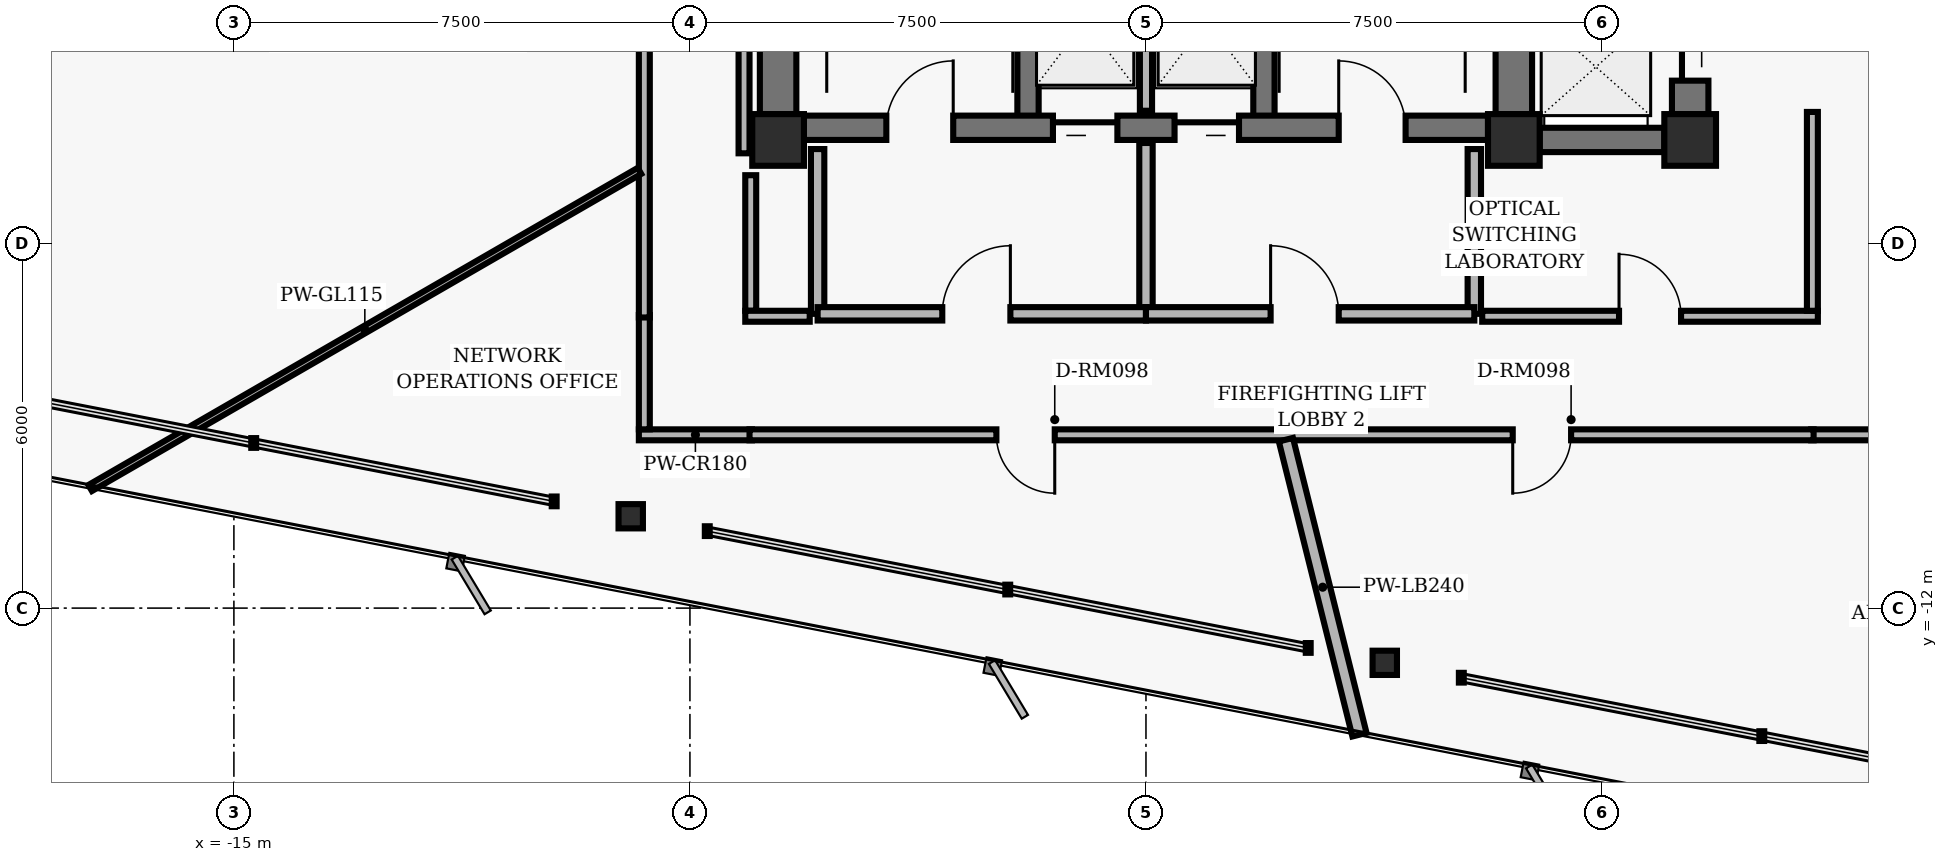
"""IFC4 building model, lengths in metres.
Left out: names, types, materials, properties, quantities, classifications, styles, units other than length and angle.
Written with IfcOpenShell. Run it as: python <this file> out.ifc"""

import sys

from ifc_helpers import new_model, si_unit, direction, frame, frame_2d, origin, origin_2d, place, context, subcontext, project, spatial, rectangle, hollow_rectangle, i_section, extrude, element, fill, save


model = new_model("IFC4")
c1 = context("Model", 3, precision=1e-05, world=origin(), true_north=direction((0.0, 1.0)))
c2 = subcontext(c1, "Body", "Model", "MODEL_VIEW")
j1 = project(units=[si_unit("LENGTHUNIT", "METRE"), si_unit("PLANEANGLEUNIT", "RADIAN")], contexts=[c1])
p1 = place(None, origin())
s1 = spatial("IfcSite", under=j1, at=p1, CompositionType="ELEMENT")
p2 = place(p1, origin())
s2 = spatial("IfcBuilding", under=s1, at=p2, CompositionType="ELEMENT")
p3 = place(p2, frame((0.0, 0.0, 147.2)))
s3 = spatial("IfcBuildingStorey", under=s2, at=p3, CompositionType="ELEMENT", Elevation=147.2)
for number, where, z_axis, x_axis in (
    (1, (-6.05, -4.3, 0.0), (0.0, 0.0, 1.0), (1.0, 0.0, 0.0)),
    (2, (6.05, -4.3, 0.0), (0.0, 0.0, 1.0), (1.0, 0.0, 0.0)),
    (3, (8.95, -4.3, 0.0), (0.0, 0.0, 1.0), (1.0, 0.0, 0.0)),
):
    element("IfcColumn", number, at=place(p3, frame(where, z_axis=z_axis, x_axis=x_axis)), inside=s3, PredefinedType="COLUMN", context=c2, shape_type="SweptSolid", body=[
        extrude(hollow_rectangle(XDim=0.85, YDim=0.85, WallThickness=0.055, InnerFilletRadius=0.02, OuterFilletRadius=0.04, at=origin_2d()), origin(), (0.0, 0.0, 1.0), 3.04),
    ])
for number, where, z_axis, x_axis in (
    (4, (-6.05, -3.875, 0.0), (0.0, 0.0, 1.0), (0.0, 1.0, 0.0)),
    (5, (6.05, -3.875, 0.0), (0.0, 0.0, 1.0), (0.0, 1.0, 0.0)),
):
    element("IfcWall", number, at=place(p3, frame(where, z_axis=z_axis, x_axis=x_axis)), inside=s3, PredefinedType="SHEAR", context=c2, shape_type="SweptSolid", body=[
        extrude(rectangle(XDim=3.45, YDim=0.6, at=frame_2d((1.725, 0.0))), origin(), (0.0, 0.0, 1.0), 2.788),
    ])
for number, where, z_axis, x_axis in (
    (6, (-1.94, -4.1, 0.0), (0.0, 0.0, 1.0), (0.0, 1.0, 0.0)),
    (7, (1.94, -4.1, 0.0), (0.0, 0.0, 1.0), (0.0, 1.0, 0.0)),
):
    element("IfcWall", number, at=place(p3, frame(where, z_axis=z_axis, x_axis=x_axis)), inside=s3, PredefinedType="SHEAR", context=c2, shape_type="SweptSolid", body=[
        extrude(rectangle(XDim=8.2, YDim=0.35, at=frame_2d((4.1, 0.0))), origin(), (0.0, 0.0, 1.0), 2.788),
    ])
p4 = place(p3, frame((-5.625, -4.1, 0.0), z_axis=(0.0, 0.0, 1.0), x_axis=(1.0, 0.0, 0.0)))
e8 = element("IfcWall", 8, at=p4, inside=s3, PredefinedType="SHEAR", context=c2, shape_type="SweptSolid", body=[
    extrude(rectangle(XDim=11.25, YDim=0.4, at=frame_2d((5.625, 0.0))), origin(), (0.0, 0.0, 1.0), 2.788),
])
p5 = place(p4, frame((1.355, 0.0, 0.0)))
e9 = element("IfcOpeningElement", 9, at=p5, cuts=e8, PredefinedType="OPENING", context=c2, shape_type="SweptSolid", body=[
    extrude(rectangle(XDim=1.1, YDim=2.04, at=frame_2d((0.55, 1.02))), frame((0.0, 0.21, 0.0), z_axis=(0.0, -1.0, 0.0), x_axis=(1.0, 0.0, 0.0)), (0.0, 0.0, 1.0), 0.42),
])
p6 = place(p4, frame((8.795, 0.0, 0.0)))
e10 = element("IfcOpeningElement", 10, at=p6, cuts=e8, PredefinedType="OPENING", context=c2, shape_type="SweptSolid", body=[
    extrude(rectangle(XDim=1.1, YDim=2.04, at=frame_2d((0.55, 1.02))), frame((0.0, 0.21, 0.0), z_axis=(0.0, -1.0, 0.0), x_axis=(1.0, 0.0, 0.0)), (0.0, 0.0, 1.0), 0.42),
])
p7 = place(p4, frame((4.095, 0.0, 0.0)))
e11 = element("IfcOpeningElement", 11, at=p7, cuts=e8, PredefinedType="OPENING", context=c2, shape_type="SweptSolid", body=[
    extrude(rectangle(XDim=1.06, YDim=2.04, at=frame_2d((0.53, 1.02))), frame((0.0, 0.21, 0.0), z_axis=(0.0, -1.0, 0.0), x_axis=(1.0, 0.0, 0.0)), (0.0, 0.0, 1.0), 0.42),
])
p8 = place(p4, frame((6.095, 0.0, 0.0)))
e12 = element("IfcOpeningElement", 12, at=p8, cuts=e8, PredefinedType="OPENING", context=c2, shape_type="SweptSolid", body=[
    extrude(rectangle(XDim=1.06, YDim=2.04, at=frame_2d((0.53, 1.02))), frame((0.0, 0.21, 0.0), z_axis=(0.0, -1.0, 0.0), x_axis=(1.0, 0.0, 0.0)), (0.0, 0.0, 1.0), 0.42),
])
p9 = place(p3, frame((8.95, -3.875, 0.0), z_axis=(0.0, 0.0, 1.0), x_axis=(0.0, 1.0, 0.0)))
e13 = element("IfcWall", 13, at=p9, inside=s3, PredefinedType="SHEAR", context=c2, shape_type="SweptSolid", body=[
    extrude(rectangle(XDim=7.95, YDim=0.6, at=frame_2d((3.975, 0.0))), origin(), (0.0, 0.0, 1.0), 2.788),
])
p10 = place(p9, frame((0.55, 0.0, 0.0)))
e14 = element("IfcOpeningElement", 14, at=p10, cuts=e13, PredefinedType="OPENING", context=c2, shape_type="SweptSolid", body=[
    extrude(rectangle(XDim=1.06, YDim=2.04, at=frame_2d((0.53, 1.02))), frame((0.0, 0.31, 0.0), z_axis=(0.0, -1.0, 0.0), x_axis=(1.0, 0.0, 0.0)), (0.0, 0.0, 1.0), 0.62),
])
p11 = place(p9, frame((3.445, 0.0, 0.0)))
e15 = element("IfcOpeningElement", 15, at=p11, cuts=e13, PredefinedType="OPENING", context=c2, shape_type="SweptSolid", body=[
    extrude(rectangle(XDim=1.06, YDim=2.04, at=frame_2d((0.53, 1.02))), frame((0.0, 0.31, 0.0), z_axis=(0.0, -1.0, 0.0), x_axis=(1.0, 0.0, 0.0)), (0.0, 0.0, 1.0), 0.62),
])
p12 = place(p9, frame((6.33, 0.0, 0.0)))
e16 = element("IfcOpeningElement", 16, at=p12, cuts=e13, PredefinedType="OPENING", context=c2, shape_type="SweptSolid", body=[
    extrude(rectangle(XDim=1.06, YDim=2.04, at=frame_2d((0.53, 1.02))), frame((0.0, 0.31, 0.0), z_axis=(0.0, -1.0, 0.0), x_axis=(1.0, 0.0, 0.0)), (0.0, 0.0, 1.0), 0.62),
])
p13 = place(p3, frame((6.475, -4.3, 0.0), z_axis=(0.0, 0.0, 1.0), x_axis=(1.0, 0.0, 0.0)))
e17 = element("IfcWall", 17, at=p13, inside=s3, PredefinedType="SHEAR", context=c2, shape_type="SweptSolid", body=[
    extrude(rectangle(XDim=2.05, YDim=0.4, at=frame_2d((1.025, 0.0))), origin(), (0.0, 0.0, 1.0), 2.788),
])
for number, where, z_axis, x_axis in (
    (18, (-8.474, -10.49, 0.0), (0.0, 0.0, 1.0), (1.0, 0.0, 0.0)),
    (19, (3.927, -12.9, 0.0), (0.0, 0.0, 1.0), (1.0, 0.0, 0.0)),
):
    element("IfcColumn", number, at=place(p3, frame(where, z_axis=z_axis, x_axis=x_axis)), inside=s3, PredefinedType="COLUMN", context=c2, shape_type="SweptSolid", body=[
        extrude(i_section(OverallWidth=0.401, OverallDepth=0.399, WebThickness=0.025, FlangeThickness=0.04, FilletRadius=0.018, at=origin_2d()), origin(), (0.0, 0.0, 1.0), 3.04),
    ])
p14 = place(p3, frame((0.0, -3.82, 0.0), z_axis=(0.0, 0.0, 1.0), x_axis=(0.0, 1.0, 0.0)))
e20 = element("IfcWall", 20, at=p14, inside=s3, PredefinedType="PARTITIONING", context=c2, shape_type="SweptSolid", body=[
    extrude(rectangle(XDim=2.67, YDim=0.2, at=frame_2d((1.335, 0.0))), origin(), (0.0, 0.0, 1.0), 2.763),
])
for number, where, z_axis, x_axis in (
    (21, (-5.4, -7.16, 0.0), (0.0, 0.0, 1.0), (0.0, 1.0, 0.0)),
    (22, (5.4, -7.16, 0.0), (0.0, 0.0, 1.0), (0.0, 1.0, 0.0)),
):
    element("IfcWall", number, at=place(p3, frame(where, z_axis=z_axis, x_axis=x_axis)), inside=s3, PredefinedType="PARTITIONING", context=c2, shape_type="SweptSolid", body=[
        extrude(rectangle(XDim=2.71, YDim=0.22, at=frame_2d((1.355, 0.0))), origin(), (0.0, 0.0, 1.0), 2.763),
    ])
p15 = place(p3, frame((0.0, -7.16, 0.0), z_axis=(0.0, 0.0, 1.0), x_axis=(0.0, 1.0, 0.0)))
e23 = element("IfcWall", 23, at=p15, inside=s3, PredefinedType="PARTITIONING", context=c2, shape_type="SweptSolid", body=[
    extrude(rectangle(XDim=2.81, YDim=0.22, at=frame_2d((1.405, 0.0))), origin(), (0.0, 0.0, 1.0), 2.763),
])
p16 = place(p3, frame((-5.4, -7.16, 0.0), z_axis=(0.0, 0.0, 1.0), x_axis=(1.0, 0.0, 0.0)))
e24 = element("IfcWall", 24, at=p16, inside=s3, PredefinedType="PARTITIONING", context=c2, shape_type="SweptSolid", body=[
    extrude(rectangle(XDim=5.4, YDim=0.22, at=frame_2d((2.7, 0.0))), origin(), (0.0, 0.0, 1.0), 2.33),
])
p17 = place(p16, frame((2.05, 0.0, 0.0)))
e25 = element("IfcOpeningElement", 25, at=p17, cuts=e24, PredefinedType="OPENING", context=c2, shape_type="SweptSolid", body=[
    extrude(rectangle(XDim=1.12, YDim=2.02, at=frame_2d((0.56, 1.01))), frame((0.0, 0.12, 0.0), z_axis=(0.0, -1.0, 0.0), x_axis=(1.0, 0.0, 0.0)), (0.0, 0.0, 1.0), 0.24),
])
p18 = place(p3, frame((0.0, -7.16, 0.0), z_axis=(0.0, 0.0, 1.0), x_axis=(1.0, 0.0, 0.0)))
e26 = element("IfcWall", 26, at=p18, inside=s3, PredefinedType="PARTITIONING", context=c2, shape_type="SweptSolid", body=[
    extrude(rectangle(XDim=5.4, YDim=0.22, at=frame_2d((2.7, 0.0))), origin(), (0.0, 0.0, 1.0), 2.33),
])
p19 = place(p18, frame((2.05, 0.0, 0.0)))
e27 = element("IfcOpeningElement", 27, at=p19, cuts=e26, PredefinedType="OPENING", context=c2, shape_type="SweptSolid", body=[
    extrude(rectangle(XDim=1.12, YDim=2.02, at=frame_2d((0.56, 1.01))), frame((0.0, 0.12, 0.0), z_axis=(0.0, -1.0, 0.0), x_axis=(1.0, 0.0, 0.0)), (0.0, 0.0, 1.0), 0.24),
])
p20 = place(p3, frame((-6.48, -9.15, 0.0), z_axis=(0.0, 0.0, 1.0), x_axis=(-1.0, 0.0, 0.0)))
e28 = element("IfcWall", 28, at=p20, inside=s3, PredefinedType="PARTITIONING", context=c2, shape_type="SweptSolid", body=[
    extrude(rectangle(XDim=1.86, YDim=0.18, at=frame_2d((0.93, 0.0))), origin(), (0.0, 0.0, 1.0), 2.33),
])
p21 = place(p3, frame((-8.25, -9.06, 0.0), z_axis=(0.0, 0.0, 1.0), x_axis=(0.0, 1.0, 0.0)))
e29 = element("IfcWall", 29, at=p21, inside=s3, PredefinedType="PARTITIONING", context=c2, shape_type="SweptSolid", body=[
    extrude(rectangle(XDim=1.88, YDim=0.18, at=frame_2d((0.94, 0.0))), origin(), (0.0, 0.0, 1.0), 2.763),
])
p22 = place(p3, frame((-8.25, -7.22, 0.0), z_axis=(0.0, 0.0, 1.0), x_axis=(0.0, 1.0, 0.0)))
e30 = element("IfcWall", 30, at=p22, inside=s3, PredefinedType="PARTITIONING", context=c2, shape_type="SweptSolid", body=[
    extrude(rectangle(XDim=14.44, YDim=0.18, at=frame_2d((7.22, 0.0))), origin(), (0.0, 0.0, 1.0), 2.763),
])
p23 = place(p22, frame((7.366, 0.0, 0.0)))
e31 = element("IfcOpeningElement", 31, at=p23, cuts=e30, PredefinedType="OPENING", context=c2, shape_type="SweptSolid", body=[
    extrude(rectangle(XDim=0.96, YDim=2.02, at=frame_2d((0.48, 1.01))), frame((0.0, 0.1, 0.0), z_axis=(0.0, -1.0, 0.0), x_axis=(1.0, 0.0, 0.0)), (0.0, 0.0, 1.0), 0.2),
])
p24 = place(p3, frame((-6.61, 4.94, 0.0), z_axis=(0.0, 0.0, 1.0), x_axis=(0.0, -1.0, 0.0)))
e32 = element("IfcWall", 32, at=p24, inside=s3, PredefinedType="PARTITIONING", context=c2, shape_type="SweptSolid", body=[
    extrude(rectangle(XDim=9.46, YDim=0.18, at=frame_2d((4.73, 0.0))), origin(), (0.0, 0.0, 1.0), 2.763),
])
p25 = place(p3, frame((-6.5, -4.88, 0.0), z_axis=(0.0, 0.0, 1.0), x_axis=(0.0, -1.0, 0.0)))
e33 = element("IfcWall", 33, at=p25, inside=s3, PredefinedType="PARTITIONING", context=c2, shape_type="SweptSolid", body=[
    extrude(rectangle(XDim=2.23, YDim=0.18, at=frame_2d((1.115, 0.0))), origin(), (0.0, 0.0, 1.0), 2.763),
])
p26 = place(p3, frame((-6.59, -7.2, 0.0), z_axis=(0.0, 0.0, 1.0), x_axis=(1.0, 0.0, 0.0)))
e34 = element("IfcWall", 34, at=p26, inside=s3, PredefinedType="PARTITIONING", context=c2, shape_type="SweptSolid", body=[
    extrude(rectangle(XDim=1.06, YDim=0.18, at=frame_2d((0.53, 0.0))), origin(), (0.0, 0.0, 1.0), 2.763),
])
p27 = place(p3, frame((5.53, -7.2, 0.0), z_axis=(0.0, 0.0, 1.0), x_axis=(1.0, 0.0, 0.0)))
e35 = element("IfcWall", 35, at=p27, inside=s3, PredefinedType="PARTITIONING", context=c2, shape_type="SweptSolid", body=[
    extrude(rectangle(XDim=5.52, YDim=0.18, at=frame_2d((2.76, 0.0))), origin(), (0.0, 0.0, 1.0), 2.33),
])
p28 = place(p27, frame((2.25, 0.0, 0.0)))
e36 = element("IfcOpeningElement", 36, at=p28, cuts=e35, PredefinedType="OPENING", context=c2, shape_type="SweptSolid", body=[
    extrude(rectangle(XDim=1.02, YDim=2.02, at=frame_2d((0.51, 1.01))), frame((0.0, 0.1, 0.0), z_axis=(0.0, -1.0, 0.0), x_axis=(1.0, 0.0, 0.0)), (0.0, 0.0, 1.0), 0.2),
])
p29 = place(p3, frame((10.96, -7.11, 0.0), z_axis=(0.0, 0.0, 1.0), x_axis=(0.0, 1.0, 0.0)))
e37 = element("IfcWall", 37, at=p29, inside=s3, PredefinedType="PARTITIONING", context=c2, shape_type="SweptSolid", body=[
    extrude(rectangle(XDim=3.271, YDim=0.18, at=frame_2d((1.635, 0.0))), origin(), (0.0, 0.0, 1.0), 2.763),
])
p30 = place(p3, frame((10.954, 6.533, 0.0), z_axis=(0.0, 0.0, 1.0), x_axis=(0.325553439946, -0.945523642084, 0.0)))
e38 = element("IfcWall", 38, at=p30, inside=s3, PredefinedType="PARTITIONING", context=c2, shape_type="SweptSolid", body=[
    extrude(rectangle(XDim=11.22, YDim=0.18, at=frame_2d((5.61, 0.0))), origin(), (0.0, 0.0, 1.0), 2.763),
])
p31 = place(p3, frame((14.69, -9.15, 0.0), z_axis=(0.0, 0.0, 1.0), x_axis=(-1.0, 0.0, 0.0)))
e39 = element("IfcWall", 39, at=p31, inside=s3, PredefinedType="PARTITIONING", context=c2, shape_type="SweptSolid", body=[
    extrude(rectangle(XDim=3.75, YDim=0.18, at=frame_2d((1.875, 0.0))), origin(), (0.0, 0.0, 1.0), 2.763),
])
p32 = place(p3, frame((10.98, -9.15, 0.0), z_axis=(0.0, 0.0, 1.0), x_axis=(-1.0, 0.0, 0.0)))
e40 = element("IfcWall", 40, at=p32, inside=s3, PredefinedType="PARTITIONING", context=c2, shape_type="SweptSolid", body=[
    extrude(rectangle(XDim=17.5, YDim=0.18, at=frame_2d((8.75, 0.0))), origin(), (0.0, 0.0, 1.0), 2.33),
])
p33 = place(p32, frame((12.48, 0.0, 0.0)))
e41 = element("IfcOpeningElement", 41, at=p33, cuts=e40, PredefinedType="OPENING", context=c2, shape_type="SweptSolid", body=[
    extrude(rectangle(XDim=0.96, YDim=2.02, at=frame_2d((0.48, 1.01))), frame((0.0, 0.1, 0.0), z_axis=(0.0, -1.0, 0.0), x_axis=(1.0, 0.0, 0.0)), (0.0, 0.0, 1.0), 0.2),
])
p34 = place(p32, frame((3.988, 0.0, 0.0)))
e42 = element("IfcOpeningElement", 42, at=p34, cuts=e40, PredefinedType="OPENING", context=c2, shape_type="SweptSolid", body=[
    extrude(rectangle(XDim=0.96, YDim=2.02, at=frame_2d((0.48, 1.01))), frame((0.0, 0.1, 0.0), z_axis=(0.0, -1.0, 0.0), x_axis=(1.0, 0.0, 0.0)), (0.0, 0.0, 1.0), 0.2),
])
p35 = place(p3, frame((-8.33, -4.809, 0.0), z_axis=(0.0, 0.0, 1.0), x_axis=(-0.866024997974, -0.500000702884, 0.0)))
e43 = element("IfcWall", 43, at=p35, inside=s3, PredefinedType="MOVABLE", context=c2, shape_type="SweptSolid", body=[
    extrude(rectangle(XDim=10.431, YDim=0.115, at=frame_2d((5.215, 0.0))), origin(), (0.0, 0.0, 1.0), 2.132),
])
p36 = place(p3, frame((2.301, -9.23, 0.0), z_axis=(0.0, 0.0, 1.0), x_axis=(0.241903783585, -0.970300241929, 0.0)))
e44 = element("IfcWall", 44, at=p36, inside=s3, PredefinedType="PARTITIONING", context=c2, shape_type="SweptSolid", body=[
    extrude(rectangle(XDim=5.001, YDim=0.24, at=frame_2d((2.5, 0.0))), origin(), (0.0, 0.0, 1.0), 2.763),
])
p37 = place(p5, origin())
e45 = element("IfcDoor", 45, at=p37, inside=s3, OperationType="SINGLE_SWING_RIGHT", PredefinedType="DOOR", context=c2, shape_type="SweptSolid", body=[
    extrude(rectangle(XDim=1.1, YDim=2.04, at=frame_2d((0.55, 1.02))), frame((0.0, 0.025, 0.0), z_axis=(0.0, -1.0, 0.0), x_axis=(1.0, 0.0, 0.0)), (0.0, 0.0, 1.0), 0.05),
])
fill(e9, e45)
p38 = place(p6, origin())
e46 = element("IfcDoor", 46, at=p38, inside=s3, OperationType="SINGLE_SWING_LEFT", PredefinedType="DOOR", context=c2, shape_type="SweptSolid", body=[
    extrude(rectangle(XDim=1.1, YDim=2.04, at=frame_2d((0.55, 1.02))), frame((0.0, 0.025, 0.0), z_axis=(0.0, -1.0, 0.0), x_axis=(1.0, 0.0, 0.0)), (0.0, 0.0, 1.0), 0.05),
])
fill(e10, e46)
p39 = place(p7, origin())
e47 = element("IfcDoor", 47, at=p39, inside=s3, OperationType="SLIDING_TO_LEFT", PredefinedType="DOOR", context=c2, shape_type="SweptSolid", body=[
    extrude(rectangle(XDim=1.06, YDim=2.04, at=frame_2d((0.53, 1.02))), frame((0.0, 0.025, 0.0), z_axis=(0.0, -1.0, 0.0), x_axis=(1.0, 0.0, 0.0)), (0.0, 0.0, 1.0), 0.05),
])
fill(e11, e47)
p40 = place(p8, origin())
e48 = element("IfcDoor", 48, at=p40, inside=s3, OperationType="SLIDING_TO_RIGHT", PredefinedType="DOOR", context=c2, shape_type="SweptSolid", body=[
    extrude(rectangle(XDim=1.06, YDim=2.04, at=frame_2d((0.53, 1.02))), frame((0.0, 0.025, 0.0), z_axis=(0.0, -1.0, 0.0), x_axis=(1.0, 0.0, 0.0)), (0.0, 0.0, 1.0), 0.05),
])
fill(e12, e48)
p41 = place(p17, origin())
e49 = element("IfcDoor", 49, at=p41, inside=s3, OperationType="SINGLE_SWING_RIGHT", PredefinedType="DOOR", context=c2, shape_type="SweptSolid", body=[
    extrude(rectangle(XDim=1.12, YDim=2.02, at=frame_2d((0.56, 1.01))), frame((0.0, 0.025, 0.0), z_axis=(0.0, -1.0, 0.0), x_axis=(1.0, 0.0, 0.0)), (0.0, 0.0, 1.0), 0.05),
])
fill(e25, e49)
p42 = place(p19, origin())
e50 = element("IfcDoor", 50, at=p42, inside=s3, OperationType="SINGLE_SWING_LEFT", PredefinedType="DOOR", context=c2, shape_type="SweptSolid", body=[
    extrude(rectangle(XDim=1.12, YDim=2.02, at=frame_2d((0.56, 1.01))), frame((0.0, 0.025, 0.0), z_axis=(0.0, -1.0, 0.0), x_axis=(1.0, 0.0, 0.0)), (0.0, 0.0, 1.0), 0.05),
])
fill(e27, e50)
p43 = place(p10, origin())
e51 = element("IfcDoor", 51, at=p43, inside=s3, OperationType="SLIDING_TO_LEFT", PredefinedType="DOOR", context=c2, shape_type="SweptSolid", body=[
    extrude(rectangle(XDim=1.06, YDim=2.04, at=frame_2d((0.53, 1.02))), frame((0.0, 0.025, 0.0), z_axis=(0.0, -1.0, 0.0), x_axis=(1.0, 0.0, 0.0)), (0.0, 0.0, 1.0), 0.05),
])
fill(e14, e51)
p44 = place(p33, origin())
e52 = element("IfcDoor", 52, at=p44, inside=s3, OperationType="SINGLE_SWING_LEFT", PredefinedType="DOOR", context=c2, shape_type="SweptSolid", body=[
    extrude(rectangle(XDim=0.96, YDim=2.02, at=frame_2d((0.48, 1.01))), frame((0.0, 0.025, 0.0), z_axis=(0.0, -1.0, 0.0), x_axis=(1.0, 0.0, 0.0)), (0.0, 0.0, 1.0), 0.05),
])
fill(e41, e52)
p45 = place(p34, origin())
e53 = element("IfcDoor", 53, at=p45, inside=s3, OperationType="SINGLE_SWING_RIGHT", PredefinedType="DOOR", context=c2, shape_type="SweptSolid", body=[
    extrude(rectangle(XDim=0.96, YDim=2.02, at=frame_2d((0.48, 1.01))), frame((0.0, 0.025, 0.0), z_axis=(0.0, -1.0, 0.0), x_axis=(1.0, 0.0, 0.0)), (0.0, 0.0, 1.0), 0.05),
])
fill(e42, e53)
p46 = place(p28, origin())
e54 = element("IfcDoor", 54, at=p46, inside=s3, OperationType="SINGLE_SWING_LEFT", PredefinedType="DOOR", context=c2, shape_type="SweptSolid", body=[
    extrude(rectangle(XDim=1.02, YDim=2.02, at=frame_2d((0.51, 1.01))), frame((0.0, 0.025, 0.0), z_axis=(0.0, -1.0, 0.0), x_axis=(1.0, 0.0, 0.0)), (0.0, 0.0, 1.0), 0.05),
])
fill(e36, e54)
save(model, sys.argv[1])
